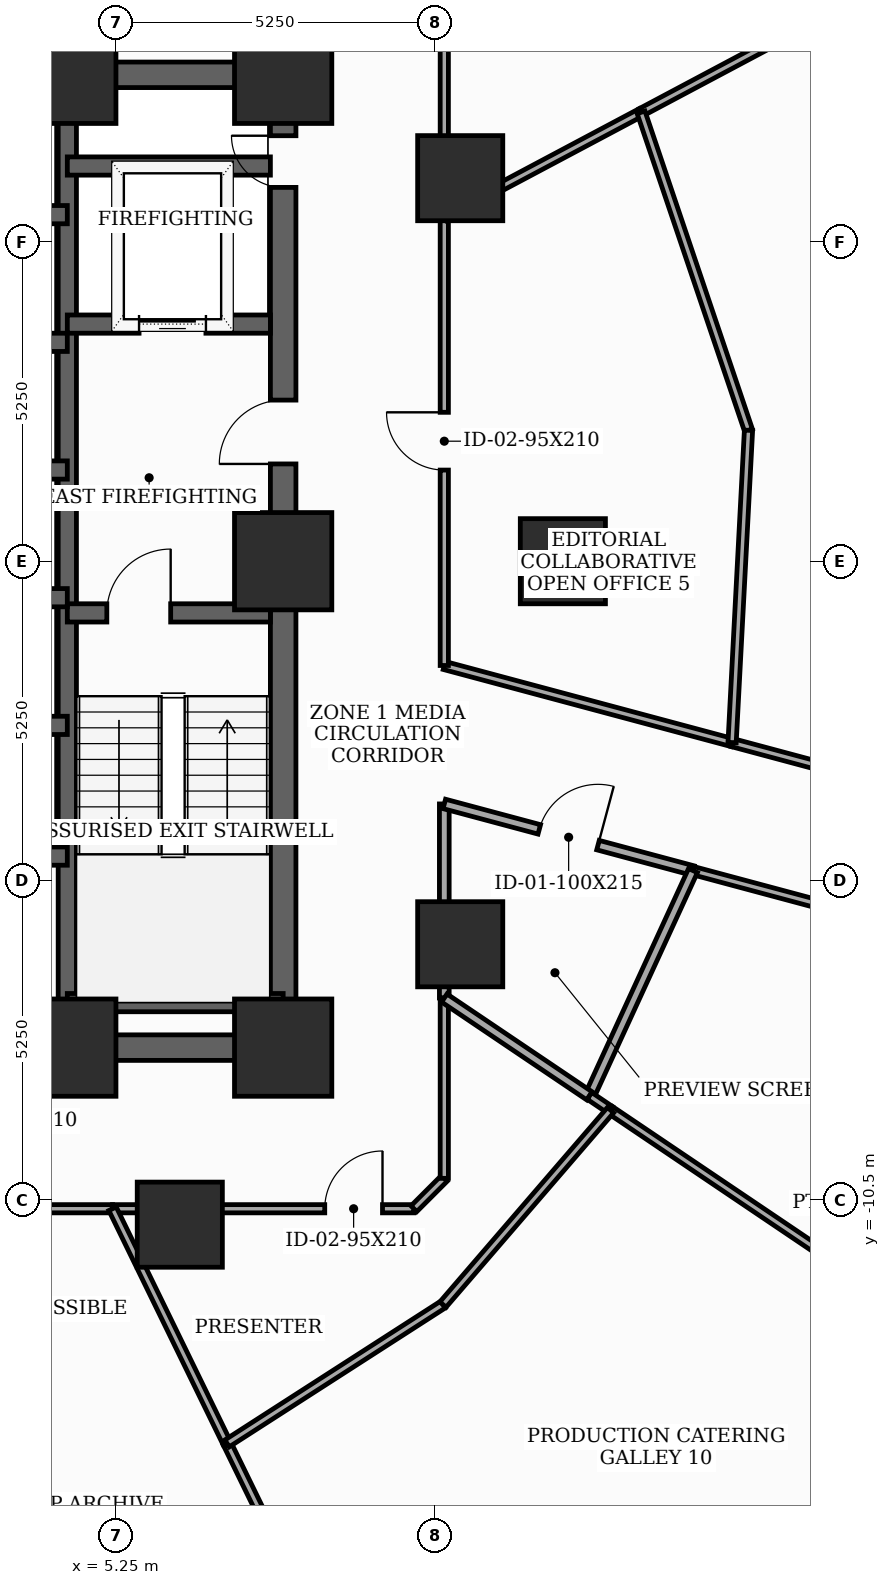
"""IFC4 building model, lengths in metres.
Left out: names, types, materials, properties, quantities, classifications, styles, units other than length and angle.
Written with IfcOpenShell. Run it as: python <this file> out.ifc"""

import sys

from ifc_helpers import new_model, si_unit, direction, frame, frame_2d, origin, origin_2d, place, context, subcontext, project, spatial, rectangle, extrude, element, fill, save


model = new_model("IFC4")
c1 = context("Model", 3, precision=1e-05, world=origin(), true_north=direction((0.0, 1.0)))
c2 = subcontext(c1, "Body", "Model", "MODEL_VIEW")
j1 = project(units=[si_unit("LENGTHUNIT", "METRE"), si_unit("PLANEANGLEUNIT", "RADIAN")], contexts=[c1])
p1 = place(None, origin())
s1 = spatial("IfcSite", under=j1, at=p1, CompositionType="ELEMENT")
p2 = place(p1, origin())
s2 = spatial("IfcBuilding", under=s1, at=p2, CompositionType="ELEMENT")
p3 = place(p2, frame((0.0, 0.0, 37.1)))
s3 = spatial("IfcBuildingStorey", under=s2, at=p3, CompositionType="ELEMENT", Elevation=37.1)
for number, where, z_axis, x_axis in (
    (1, (4.45, -8.0, 0.0), (0.0, 0.0, 1.0), (1.0, 0.0, 0.0)),
    (2, (8.0, -8.0, 0.0), (0.0, 0.0, 1.0), (1.0, 0.0, 0.0)),
    (3, (8.0, 0.0, 0.0), (0.0, 0.0, 1.0), (1.0, 0.0, 0.0)),
    (4, (8.0, 8.0, 0.0), (0.0, 0.0, 1.0), (1.0, 0.0, 0.0)),
    (5, (4.45, 8.0, 0.0), (0.0, 0.0, 1.0), (1.0, 0.0, 0.0)),
):
    element("IfcColumn", number, at=place(p3, frame(where, z_axis=z_axis, x_axis=x_axis)), inside=s3, PredefinedType="COLUMN", context=c2, shape_type="SweptSolid", body=[
        extrude(rectangle(XDim=1.6, YDim=1.6, at=origin_2d()), origin(), (0.0, 0.0, 1.0), 3.7),
    ])
for number, where, z_axis, x_axis in (
    (6, (12.6, 0.0, 0.0), (0.0, 0.0, 1.0), (1.0, 0.0, 0.0)),
    (7, (10.912, 6.3, 0.0), (0.0, 0.0, 1.0), (1.0, 0.0, 0.0)),
    (8, (6.3, -10.912, 0.0), (0.0, 0.0, 1.0), (1.0, 0.0, 0.0)),
    (9, (10.912, -6.3, 0.0), (0.0, 0.0, 1.0), (1.0, 0.0, 0.0)),
):
    element("IfcColumn", number, at=place(p3, frame(where, z_axis=z_axis, x_axis=x_axis)), inside=s3, PredefinedType="COLUMN", context=c2, shape_type="SweptSolid", body=[
        extrude(rectangle(XDim=1.4, YDim=1.4, at=origin_2d()), origin(), (0.0, 0.0, 1.0), 3.7),
    ])
p4 = place(p3, frame((8.0, -8.0, 0.0), z_axis=(0.0, 0.0, 1.0), x_axis=(0.0, 1.0, 0.0)))
e10 = element("IfcWall", 10, at=p4, inside=s3, PredefinedType="SHEAR", context=c2, shape_type="SweptSolid", body=[
    extrude(rectangle(XDim=16.0, YDim=0.42, at=frame_2d((8.0, 0.0))), origin(), (0.0, 0.0, 1.0), 3.5),
])
p5 = place(p4, frame((9.6, 0.0, 0.0)))
e11 = element("IfcOpeningElement", 11, at=p5, cuts=e10, PredefinedType="OPENING", context=c2, shape_type="SweptSolid", body=[
    extrude(rectangle(XDim=1.05, YDim=2.15, at=frame_2d((0.525, 1.075))), frame((0.0, 0.22, 0.0), z_axis=(0.0, -1.0, 0.0), x_axis=(1.0, 0.0, 0.0)), (0.0, 0.0, 1.0), 0.44),
])
p6 = place(p4, frame((14.148, 0.0, 0.0)))
e12 = element("IfcOpeningElement", 12, at=p6, cuts=e10, PredefinedType="OPENING", context=c2, shape_type="SweptSolid", body=[
    extrude(rectangle(XDim=0.85, YDim=2.02, at=frame_2d((0.425, 1.01))), frame((0.0, 0.22, 0.0), z_axis=(0.0, -1.0, 0.0), x_axis=(1.0, 0.0, 0.0)), (0.0, 0.0, 1.0), 0.44),
])
p7 = place(p3, frame((-8.0, -8.0, 0.0), z_axis=(0.0, 0.0, 1.0), x_axis=(1.0, 0.0, 0.0)))
e13 = element("IfcWall", 13, at=p7, inside=s3, PredefinedType="SHEAR", context=c2, shape_type="SweptSolid", body=[
    extrude(rectangle(XDim=16.0, YDim=0.42, at=frame_2d((8.0, 0.0))), origin(), (0.0, 0.0, 1.0), 3.5),
])
p8 = place(p7, frame((5.2, 0.0, 0.0)))
e14 = element("IfcOpeningElement", 14, at=p8, cuts=e13, PredefinedType="OPENING", context=c2, shape_type="SweptSolid", body=[
    extrude(rectangle(XDim=0.95, YDim=2.1, at=frame_2d((0.475, 1.05))), frame((0.0, 0.22, 0.0), z_axis=(0.0, -1.0, 0.0), x_axis=(1.0, 0.0, 0.0)), (0.0, 0.0, 1.0), 0.44),
])
p9 = place(p7, frame((9.8, 0.0, 0.0)))
e15 = element("IfcOpeningElement", 15, at=p9, cuts=e13, PredefinedType="OPENING", context=c2, shape_type="SweptSolid", body=[
    extrude(rectangle(XDim=0.95, YDim=2.1, at=frame_2d((0.475, 1.05))), frame((0.0, 0.22, 0.0), z_axis=(0.0, -1.0, 0.0), x_axis=(1.0, 0.0, 0.0)), (0.0, 0.0, 1.0), 0.44),
])
p10 = place(p3, frame((-8.0, 8.0, 0.0), z_axis=(0.0, 0.0, 1.0), x_axis=(1.0, 0.0, 0.0)))
e16 = element("IfcWall", 16, at=p10, inside=s3, PredefinedType="SHEAR", context=c2, shape_type="SweptSolid", body=[
    extrude(rectangle(XDim=16.0, YDim=0.42, at=frame_2d((8.0, 0.0))), origin(), (0.0, 0.0, 1.0), 3.5),
])
p11 = place(p10, frame((7.1, 0.0, 0.0)))
e17 = element("IfcOpeningElement", 17, at=p11, cuts=e16, PredefinedType="OPENING", context=c2, shape_type="SweptSolid", body=[
    extrude(rectangle(XDim=1.8, YDim=2.15, at=frame_2d((0.9, 1.075))), frame((0.0, 0.22, 0.0), z_axis=(0.0, -1.0, 0.0), x_axis=(1.0, 0.0, 0.0)), (0.0, 0.0, 1.0), 0.44),
])
p12 = place(p3, frame((4.45, -7.79, 0.0), z_axis=(0.0, 0.0, 1.0), x_axis=(0.0, 1.0, 0.0)))
e18 = element("IfcWall", 18, at=p12, inside=s3, PredefinedType="SHEAR", context=c2, shape_type="SweptSolid", body=[
    extrude(rectangle(XDim=15.58, YDim=0.3, at=frame_2d((7.79, 0.0))), origin(), (0.0, 0.0, 1.0), 3.5),
])
p13 = place(p3, frame((4.45, -0.85, 0.0), z_axis=(0.0, 0.0, 1.0), x_axis=(1.0, 0.0, 0.0)))
e19 = element("IfcWall", 19, at=p13, inside=s3, PredefinedType="SHEAR", context=c2, shape_type="SweptSolid", body=[
    extrude(rectangle(XDim=3.34, YDim=0.3, at=frame_2d((1.67, 0.0))), origin(), (0.0, 0.0, 1.0), 3.5),
])
p14 = place(p13, frame((0.65, 0.0, 0.0)))
e20 = element("IfcOpeningElement", 20, at=p14, cuts=e19, PredefinedType="OPENING", context=c2, shape_type="SweptSolid", body=[
    extrude(rectangle(XDim=1.05, YDim=2.15, at=frame_2d((0.525, 1.075))), frame((0.0, 0.16, 0.0), z_axis=(0.0, -1.0, 0.0), x_axis=(1.0, 0.0, 0.0)), (0.0, 0.0, 1.0), 0.32),
])
p15 = place(p3, frame((4.45, -7.26, 0.0), z_axis=(0.0, 0.0, 1.0), x_axis=(1.0, 0.0, 0.0)))
e21 = element("IfcWall", 21, at=p15, inside=s3, PredefinedType="SHEAR", context=c2, shape_type="SweptSolid", body=[
    extrude(rectangle(XDim=3.55, YDim=0.3, at=frame_2d((1.775, 0.0))), origin(), (0.0, 0.0, 1.0), 3.5),
])
p16 = place(p3, frame((4.45, 3.9, 0.0), z_axis=(0.0, 0.0, 1.0), x_axis=(1.0, 0.0, 0.0)))
e22 = element("IfcWall", 22, at=p16, inside=s3, PredefinedType="SHEAR", context=c2, shape_type="SweptSolid", body=[
    extrude(rectangle(XDim=3.34, YDim=0.3, at=frame_2d((1.67, 0.0))), origin(), (0.0, 0.0, 1.0), 3.5),
])
p17 = place(p16, frame((1.18, 0.0, 0.0)))
e23 = element("IfcOpeningElement", 23, at=p17, cuts=e22, PredefinedType="OPENING", context=c2, shape_type="SweptSolid", body=[
    extrude(rectangle(XDim=1.1, YDim=2.1, at=frame_2d((0.55, 1.05))), frame((0.0, 0.16, 0.0), z_axis=(0.0, -1.0, 0.0), x_axis=(1.0, 0.0, 0.0)), (0.0, 0.0, 1.0), 0.32),
])
p18 = place(p3, frame((4.45, 6.5, 0.0), z_axis=(0.0, 0.0, 1.0), x_axis=(1.0, 0.0, 0.0)))
e24 = element("IfcWall", 24, at=p18, inside=s3, PredefinedType="SHEAR", context=c2, shape_type="SweptSolid", body=[
    extrude(rectangle(XDim=3.34, YDim=0.3, at=frame_2d((1.67, 0.0))), origin(), (0.0, 0.0, 1.0), 3.5),
])
p19 = place(p3, frame((-4.45, -4.85, 0.0), z_axis=(0.0, 0.0, 1.0), x_axis=(1.0, 0.0, 0.0)))
e25 = element("IfcWall", 25, at=p19, inside=s3, PredefinedType="SHEAR", context=c2, shape_type="SweptSolid", body=[
    extrude(rectangle(XDim=8.9, YDim=0.3, at=frame_2d((4.45, 0.0))), origin(), (0.0, 0.0, 1.0), 3.5),
])
for number, where, z_axis, x_axis in (
    (26, (1.68, 1.5, 0.0), (0.0, 0.0, 1.0), (1.0, 0.0, 0.0)),
    (27, (1.68, 3.6, 0.0), (0.0, 0.0, 1.0), (1.0, 0.0, 0.0)),
    (28, (1.68, 5.7, 0.0), (0.0, 0.0, 1.0), (1.0, 0.0, 0.0)),
    (29, (1.68, -2.7, 0.0), (0.0, 0.0, 1.0), (1.0, 0.0, 0.0)),
    (30, (1.68, -0.6, 0.0), (0.0, 0.0, 1.0), (1.0, 0.0, 0.0)),
):
    element("IfcWall", number, at=place(p3, frame(where, z_axis=z_axis, x_axis=x_axis)), inside=s3, PredefinedType="SHEAR", context=c2, shape_type="SweptSolid", body=[
        extrude(rectangle(XDim=2.77, YDim=0.3, at=frame_2d((1.385, 0.0))), origin(), (0.0, 0.0, 1.0), 3.5),
    ])
p20 = place(p3, frame((10.65, 5.663, 0.0), z_axis=(0.0, 0.0, 1.0), x_axis=(0.0, 1.0, 0.0)))
e31 = element("IfcWall", 31, at=p20, inside=s3, PredefinedType="PARTITIONING", context=c2, shape_type="SweptSolid", body=[
    extrude(rectangle(XDim=4.487, YDim=0.135, at=frame_2d((2.243, 0.0))), origin(), (0.0, 0.0, 1.0), 2.785),
])
p21 = place(p3, frame((10.65, -7.184, 0.0), z_axis=(0.0, 0.0, 1.0), x_axis=(0.0, 1.0, 0.0)))
e32 = element("IfcWall", 32, at=p21, inside=s3, PredefinedType="PARTITIONING", context=c2, shape_type="SweptSolid", body=[
    extrude(rectangle(XDim=3.192, YDim=0.16, at=frame_2d((1.596, 0.0))), origin(), (0.0, 0.0, 1.0), 2.785),
])
p22 = place(p3, frame((10.65, -3.992, 0.0), z_axis=(0.0, 0.0, 1.0), x_axis=(0.965925146235, -0.258821583086, 0.0)))
e33 = element("IfcWall", 33, at=p22, inside=s3, PredefinedType="PARTITIONING", context=c2, shape_type="SweptSolid", body=[
    extrude(rectangle(XDim=4.234, YDim=0.16, at=frame_2d((2.117, 0.0))), origin(), (0.0, 0.0, 1.0), 2.785),
])
p23 = place(p22, frame((1.617, 0.0, 0.0)))
e34 = element("IfcOpeningElement", 34, at=p23, cuts=e33, PredefinedType="OPENING", context=c2, shape_type="SweptSolid", body=[
    extrude(rectangle(XDim=1.0, YDim=2.15, at=frame_2d((0.5, 1.075))), frame((0.0, 0.09, 0.0), z_axis=(0.0, -1.0, 0.0), x_axis=(1.0, 0.0, 0.0)), (0.0, 0.0, 1.0), 0.18),
])
p24 = place(p3, frame((14.74, -5.088, 0.0), z_axis=(0.0, 0.0, 1.0), x_axis=(0.965895912523, -0.258930659002, 0.0)))
e35 = element("IfcWall", 35, at=p24, inside=s3, PredefinedType="PARTITIONING", context=c2, shape_type="SweptSolid", body=[
    extrude(rectangle(XDim=7.045, YDim=0.135, at=frame_2d((3.522, 0.0))), origin(), (0.0, 0.0, 1.0), 2.935),
])
p25 = place(p24, frame((3.048, 0.0, 0.0)))
e36 = element("IfcOpeningElement", 36, at=p25, cuts=e35, PredefinedType="OPENING", context=c2, shape_type="SweptSolid", body=[
    extrude(rectangle(XDim=0.95, YDim=2.1, at=frame_2d((0.475, 1.05))), frame((0.0, 0.077, 0.0), z_axis=(0.0, -1.0, 0.0), x_axis=(1.0, 0.0, 0.0)), (0.0, 0.0, 1.0), 0.155),
])
p26 = place(p3, frame((22.115, -4.787, 0.0), z_axis=(0.0, 0.0, 1.0), x_axis=(-0.965912084765, 0.258870323726, 0.0)))
e37 = element("IfcWall", 37, at=p26, inside=s3, PredefinedType="PARTITIONING", context=c2, shape_type="SweptSolid", body=[
    extrude(rectangle(XDim=6.969, YDim=0.135, at=frame_2d((3.485, 0.0))), origin(), (0.0, 0.0, 1.0), 3.085),
])
p27 = place(p3, frame((15.383, -2.983, 0.0), z_axis=(0.0, 0.0, 1.0), x_axis=(-0.965947384406, 0.258738575706, 0.0)))
e38 = element("IfcWall", 38, at=p27, inside=s3, PredefinedType="PARTITIONING", context=c2, shape_type="SweptSolid", body=[
    extrude(rectangle(XDim=4.9, YDim=0.135, at=frame_2d((2.45, 0.0))), origin(), (0.0, 0.0, 1.0), 2.785),
])
p28 = place(p3, frame((10.65, -1.715, 0.0), z_axis=(0.0, 0.0, 1.0), x_axis=(0.0, 1.0, 0.0)))
e39 = element("IfcWall", 39, at=p28, inside=s3, PredefinedType="PARTITIONING", context=c2, shape_type="SweptSolid", body=[
    extrude(rectangle(XDim=7.378, YDim=0.135, at=frame_2d((3.689, 0.0))), origin(), (0.0, 0.0, 1.0), 2.785),
])
p29 = place(p28, frame((3.214, 0.0, 0.0)))
e40 = element("IfcOpeningElement", 40, at=p29, cuts=e39, PredefinedType="OPENING", context=c2, shape_type="SweptSolid", body=[
    extrude(rectangle(XDim=0.95, YDim=2.1, at=frame_2d((0.475, 1.05))), frame((0.0, 0.077, 0.0), z_axis=(0.0, -1.0, 0.0), x_axis=(1.0, 0.0, 0.0)), (0.0, 0.0, 1.0), 0.155),
])
p30 = place(p3, frame((2.45, -10.65, 0.0), z_axis=(0.0, 0.0, 1.0), x_axis=(1.0, 0.0, 0.0)))
e41 = element("IfcWall", 41, at=p30, inside=s3, PredefinedType="PARTITIONING", context=c2, shape_type="SweptSolid", body=[
    extrude(rectangle(XDim=2.744, YDim=0.135, at=frame_2d((1.372, 0.0))), origin(), (0.0, 0.0, 1.0), 3.5),
])
p31 = place(p30, frame((0.568, 0.0, 0.0)))
e42 = element("IfcOpeningElement", 42, at=p31, cuts=e41, PredefinedType="OPENING", context=c2, shape_type="SweptSolid", body=[
    extrude(rectangle(XDim=0.95, YDim=2.1, at=frame_2d((0.475, 1.05))), frame((0.0, 0.077, 0.0), z_axis=(0.0, -1.0, 0.0), x_axis=(1.0, 0.0, 0.0)), (0.0, 0.0, 1.0), 0.155),
])
p32 = place(p3, frame((5.194, -10.65, 0.0), z_axis=(0.0, 0.0, 1.0), x_axis=(1.0, 0.0, 0.0)))
e43 = element("IfcWall", 43, at=p32, inside=s3, PredefinedType="PARTITIONING", context=c2, shape_type="SweptSolid", body=[
    extrude(rectangle(XDim=4.956, YDim=0.135, at=frame_2d((2.478, 0.0))), origin(), (0.0, 0.0, 1.0), 2.785),
])
p33 = place(p32, frame((3.49, 0.0, 0.0)))
e44 = element("IfcOpeningElement", 44, at=p33, cuts=e43, PredefinedType="OPENING", context=c2, shape_type="SweptSolid", body=[
    extrude(rectangle(XDim=0.95, YDim=2.1, at=frame_2d((0.475, 1.05))), frame((0.0, 0.077, 0.0), z_axis=(0.0, -1.0, 0.0), x_axis=(1.0, 0.0, 0.0)), (0.0, 0.0, 1.0), 0.155),
])
p34 = place(p3, frame((10.15, -10.65, 0.0), z_axis=(0.0, 0.0, 1.0), x_axis=(0.707106781187, 0.707106781187, 0.0)))
e45 = element("IfcWall", 45, at=p34, inside=s3, PredefinedType="PARTITIONING", context=c2, shape_type="SweptSolid", body=[
    extrude(rectangle(XDim=0.707, YDim=0.135, at=frame_2d((0.354, 0.0))), origin(), (0.0, 0.0, 1.0), 3.5),
])
p35 = place(p3, frame((10.65, -10.15, 0.0), z_axis=(0.0, 0.0, 1.0), x_axis=(0.0, 1.0, 0.0)))
e46 = element("IfcWall", 46, at=p35, inside=s3, PredefinedType="PARTITIONING", context=c2, shape_type="SweptSolid", body=[
    extrude(rectangle(XDim=2.966, YDim=0.135, at=frame_2d((1.483, 0.0))), origin(), (0.0, 0.0, 1.0), 3.5),
])
p36 = place(p3, frame((13.886, 7.383, 0.0), z_axis=(0.0, 0.0, 1.0), x_axis=(0.88293033741, 0.469504014126, 0.0)))
e47 = element("IfcWall", 47, at=p36, inside=s3, PredefinedType="PARTITIONING", context=c2, shape_type="SweptSolid", body=[
    extrude(rectangle(XDim=3.122, YDim=0.135, at=frame_2d((1.561, 0.0))), origin(), (0.0, 0.0, 1.0), 2.935),
])
p37 = place(p3, frame((10.65, 5.663, 0.0), z_axis=(0.0, 0.0, 1.0), x_axis=(0.88302513666, 0.469325695041, 0.0)))
e48 = element("IfcWall", 48, at=p37, inside=s3, PredefinedType="PARTITIONING", context=c2, shape_type="SweptSolid", body=[
    extrude(rectangle(XDim=3.665, YDim=0.135, at=frame_2d((1.833, 0.0))), origin(), (0.0, 0.0, 1.0), 2.785),
])
p38 = place(p3, frame((13.038, -8.794, 0.0), z_axis=(0.0, 0.0, 1.0), x_axis=(0.417322480709, 0.908758464662, 0.0)))
e49 = element("IfcWall", 49, at=p38, inside=s3, PredefinedType="PARTITIONING", context=c2, shape_type="SweptSolid", body=[
    extrude(rectangle(XDim=4.078, YDim=0.16, at=frame_2d((2.039, 0.0))), origin(), (0.0, 0.0, 1.0), 3.5),
])
p39 = place(p3, frame((10.65, -7.184, 0.0), z_axis=(0.0, 0.0, 1.0), x_axis=(0.829196392101, -0.558957371654, 0.0)))
e50 = element("IfcWall", 50, at=p39, inside=s3, PredefinedType="PARTITIONING", context=c2, shape_type="SweptSolid", body=[
    extrude(rectangle(XDim=2.88, YDim=0.16, at=frame_2d((1.44, 0.0))), origin(), (0.0, 0.0, 1.0), 3.5),
])
p40 = place(p3, frame((13.886, 7.383, 0.0), z_axis=(0.0, 0.0, 1.0), x_axis=(0.320099223205, -0.947384023141, 0.0)))
e51 = element("IfcWall", 51, at=p40, inside=s3, PredefinedType="PARTITIONING", context=c2, shape_type="SweptSolid", body=[
    extrude(rectangle(XDim=5.521, YDim=0.135, at=frame_2d((2.76, 0.0))), origin(), (0.0, 0.0, 1.0), 2.685),
])
p41 = place(p3, frame((15.653, 2.153, 0.0), z_axis=(0.0, 0.0, 1.0), x_axis=(-0.05250152841, -0.998620843721, 0.0)))
e52 = element("IfcWall", 52, at=p41, inside=s3, PredefinedType="PARTITIONING", context=c2, shape_type="SweptSolid", body=[
    extrude(rectangle(XDim=5.143, YDim=0.135, at=frame_2d((2.572, 0.0))), origin(), (0.0, 0.0, 1.0), 2.685),
])
p42 = place(p3, frame((13.038, -8.794, 0.0), z_axis=(0.0, 0.0, 1.0), x_axis=(0.828163729679, -0.560486250361, 0.0)))
e53 = element("IfcWall", 53, at=p42, inside=s3, PredefinedType="PARTITIONING", context=c2, shape_type="SweptSolid", body=[
    extrude(rectangle(XDim=0.418, YDim=0.135, at=frame_2d((0.209, 0.0))), origin(), (0.0, 0.0, 1.0), 3.5),
])
p43 = place(p3, frame((13.384, -9.028, 0.0), z_axis=(0.0, 0.0, 1.0), x_axis=(0.829042972493, -0.55918489765, 0.0)))
e54 = element("IfcWall", 54, at=p43, inside=s3, PredefinedType="PARTITIONING", context=c2, shape_type="SweptSolid", body=[
    extrude(rectangle(XDim=16.791, YDim=0.135, at=frame_2d((8.396, 0.0))), origin(), (0.0, 0.0, 1.0), 2.935),
])
p44 = place(p43, frame((7.936, 0.0, 0.0)))
e55 = element("IfcOpeningElement", 55, at=p44, cuts=e54, PredefinedType="OPENING", context=c2, shape_type="SweptSolid", body=[
    extrude(rectangle(XDim=0.92, YDim=2.1, at=frame_2d((0.46, 1.05))), frame((0.0, 0.077, 0.0), z_axis=(0.0, -1.0, 0.0), x_axis=(1.0, 0.0, 0.0)), (0.0, 0.0, 1.0), 0.155),
])
p45 = place(p3, frame((7.077, -14.51, 0.0), z_axis=(0.0, 0.0, 1.0), x_axis=(-0.438392272504, 0.898783742292, 0.0)))
e56 = element("IfcWall", 56, at=p45, inside=s3, PredefinedType="PARTITIONING", context=c2, shape_type="SweptSolid", body=[
    extrude(rectangle(XDim=4.295, YDim=0.135, at=frame_2d((2.147, 0.0))), origin(), (0.0, 0.0, 1.0), 2.685),
])
p46 = place(p3, frame((9.188, -18.837, 0.0), z_axis=(0.0, 0.0, 1.0), x_axis=(-0.438408644876, 0.898775756292, 0.0)))
e57 = element("IfcWall", 57, at=p46, inside=s3, PredefinedType="PARTITIONING", context=c2, shape_type="SweptSolid", body=[
    extrude(rectangle(XDim=4.814, YDim=0.135, at=frame_2d((2.407, 0.0))), origin(), (0.0, 0.0, 1.0), 2.935),
])
p47 = place(p3, frame((7.077, -14.51, 0.0), z_axis=(0.0, 0.0, 1.0), x_axis=(0.841056333741, 0.540947542258, 0.0)))
e58 = element("IfcWall", 58, at=p47, inside=s3, PredefinedType="PARTITIONING", context=c2, shape_type="SweptSolid", body=[
    extrude(rectangle(XDim=4.222, YDim=0.135, at=frame_2d((2.111, 0.0))), origin(), (0.0, 0.0, 1.0), 2.685),
])
p48 = place(p3, frame((10.628, -12.226, 0.0), z_axis=(0.0, 0.0, 1.0), x_axis=(0.652832083446, 0.757502654004, 0.0)))
e59 = element("IfcWall", 59, at=p48, inside=s3, PredefinedType="PARTITIONING", context=c2, shape_type="SweptSolid", body=[
    extrude(rectangle(XDim=4.222, YDim=0.135, at=frame_2d((2.111, 0.0))), origin(), (0.0, 0.0, 1.0), 3.5),
])
p49 = place(p5, origin())
e60 = element("IfcDoor", 60, at=p49, inside=s3, OperationType="SINGLE_SWING_LEFT", PredefinedType="DOOR", context=c2, shape_type="SweptSolid", body=[
    extrude(rectangle(XDim=1.05, YDim=2.15, at=frame_2d((0.525, 1.075))), frame((0.0, 0.025, 0.0), z_axis=(0.0, -1.0, 0.0), x_axis=(1.0, 0.0, 0.0)), (0.0, 0.0, 1.0), 0.05),
])
fill(e11, e60)
p50 = place(p6, origin())
e61 = element("IfcDoor", 61, at=p50, inside=s3, OperationType="SINGLE_SWING_RIGHT", PredefinedType="TRAPDOOR", context=c2, shape_type="SweptSolid", body=[
    extrude(rectangle(XDim=0.85, YDim=2.02, at=frame_2d((0.425, 1.01))), frame((0.0, 0.025, 0.0), z_axis=(0.0, -1.0, 0.0), x_axis=(1.0, 0.0, 0.0)), (0.0, 0.0, 1.0), 0.05),
])
fill(e12, e61)
p51 = place(p14, origin())
e62 = element("IfcDoor", 62, at=p51, inside=s3, OperationType="SINGLE_SWING_RIGHT", PredefinedType="DOOR", context=c2, shape_type="SweptSolid", body=[
    extrude(rectangle(XDim=1.05, YDim=2.15, at=frame_2d((0.525, 1.075))), frame((0.0, 0.025, 0.0), z_axis=(0.0, -1.0, 0.0), x_axis=(1.0, 0.0, 0.0)), (0.0, 0.0, 1.0), 0.05),
])
fill(e20, e62)
p52 = place(p17, origin())
e63 = element("IfcDoor", 63, at=p52, inside=s3, OperationType="SLIDING_TO_LEFT", PredefinedType="DOOR", context=c2, shape_type="SweptSolid", body=[
    extrude(rectangle(XDim=1.1, YDim=2.1, at=frame_2d((0.55, 1.05))), frame((0.0, 0.025, 0.0), z_axis=(0.0, -1.0, 0.0), x_axis=(1.0, 0.0, 0.0)), (0.0, 0.0, 1.0), 0.05),
])
fill(e23, e63)
p53 = place(p23, origin())
e64 = element("IfcDoor", 64, at=p53, inside=s3, OperationType="SINGLE_SWING_RIGHT", PredefinedType="DOOR", context=c2, shape_type="SweptSolid", body=[
    extrude(rectangle(XDim=1.0, YDim=2.15, at=frame_2d((0.5, 1.075))), frame((0.0, 0.025, 0.0), z_axis=(0.0, -1.0, 0.0), x_axis=(1.0, 0.0, 0.0)), (0.0, 0.0, 1.0), 0.05),
])
fill(e34, e64)
p54 = place(p29, origin())
e65 = element("IfcDoor", 65, at=p54, inside=s3, OperationType="SINGLE_SWING_RIGHT", PredefinedType="DOOR", context=c2, shape_type="SweptSolid", body=[
    extrude(rectangle(XDim=0.95, YDim=2.1, at=frame_2d((0.475, 1.05))), frame((0.0, 0.025, 0.0), z_axis=(0.0, -1.0, 0.0), x_axis=(1.0, 0.0, 0.0)), (0.0, 0.0, 1.0), 0.05),
])
fill(e40, e65)
p55 = place(p33, origin())
e66 = element("IfcDoor", 66, at=p55, inside=s3, OperationType="SINGLE_SWING_RIGHT", PredefinedType="DOOR", context=c2, shape_type="SweptSolid", body=[
    extrude(rectangle(XDim=0.95, YDim=2.1, at=frame_2d((0.475, 1.05))), frame((0.0, 0.025, 0.0), z_axis=(0.0, -1.0, 0.0), x_axis=(1.0, 0.0, 0.0)), (0.0, 0.0, 1.0), 0.05),
])
fill(e44, e66)
save(model, sys.argv[1])
